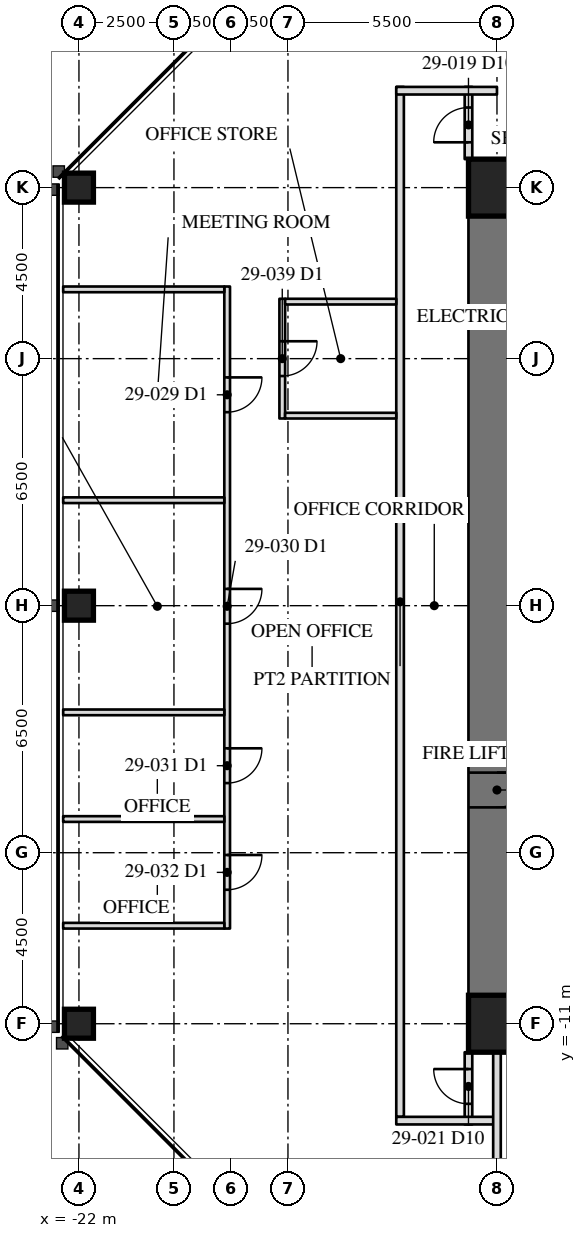
"""IFC4 building model, lengths in metres.
Left out: names, types, materials, properties, quantities, classifications, styles, units other than length and angle.
Written with IfcOpenShell. Run it as: python <this file> out.ifc"""

import sys

from ifc_helpers import new_model, si_unit, direction, frame, frame_2d, origin, origin_2d, place, context, subcontext, project, spatial, rectangle, hollow_rectangle, extrude, element, fill, save


model = new_model("IFC4")
c1 = context("Model", 3, precision=1e-05, world=origin(), true_north=direction((0.0, 1.0)))
c2 = subcontext(c1, "Body", "Model", "MODEL_VIEW")
j1 = project(units=[si_unit("LENGTHUNIT", "METRE"), si_unit("PLANEANGLEUNIT", "RADIAN")], contexts=[c1])
p1 = place(None, origin())
s1 = spatial("IfcSite", under=j1, at=p1, CompositionType="ELEMENT")
p2 = place(p1, origin())
s2 = spatial("IfcBuilding", under=s1, at=p2, CompositionType="ELEMENT")
p3 = place(p2, frame((0.0, 0.0, 125.4)))
s3 = spatial("IfcBuildingStorey", under=s2, at=p3, CompositionType="ELEMENT", Elevation=125.4)
for number, where, z_axis, x_axis in (
    (1, (-22.0, 0.0, 0.0), (0.0, 0.0, 1.0), (0.0, 1.0, 0.0)),
    (2, (-22.0, -11.0, 0.0), (0.0, 0.0, 1.0), (0.0, 1.0, 0.0)),
    (3, (-22.0, 11.0, 0.0), (0.0, 0.0, 1.0), (0.0, 1.0, 0.0)),
):
    element("IfcColumn", number, at=place(p3, frame(where, z_axis=z_axis, x_axis=x_axis)), inside=s3, PredefinedType="COLUMN", context=c2, shape_type="SweptSolid", body=[
        extrude(hollow_rectangle(XDim=0.762, YDim=0.762, WallThickness=0.076, at=origin_2d()), origin(), (0.0, 0.0, 1.0), 4.1),
    ])
p4 = place(p3, frame((-11.0, 11.0, 0.0), z_axis=(0.0, 0.0, 1.0), x_axis=(0.0, -1.0, 0.0)))
e4 = element("IfcWall", 4, at=p4, inside=s3, PredefinedType="SHEAR", context=c2, shape_type="SweptSolid", body=[
    extrude(rectangle(XDim=22.0, YDim=1.5, at=frame_2d((11.0, 0.0))), origin(), (0.0, 0.0, 1.0), 4.1),
])
p5 = place(p4, frame((15.393, 0.0, 0.0)))
e5 = element("IfcOpeningElement", 5, at=p5, cuts=e4, PredefinedType="OPENING", context=c2, shape_type="SweptSolid", body=[
    extrude(rectangle(XDim=0.915, YDim=2.134, at=frame_2d((0.458, 1.067))), frame((0.0, 0.76, 0.0), z_axis=(0.0, -1.0, 0.0), x_axis=(1.0, 0.0, 0.0)), (0.0, 0.0, 1.0), 1.52),
])
for number, where, z_axis, x_axis in (
    (6, (-6.5, 11.0, 0.0), (0.0, 0.0, 1.0), (-1.0, 0.0, 0.0)),
    (7, (-11.0, -11.0, 0.0), (0.0, 0.0, 1.0), (1.0, 0.0, 0.0)),
):
    element("IfcWall", number, at=place(p3, frame(where, z_axis=z_axis, x_axis=x_axis)), inside=s3, PredefinedType="SHEAR", context=c2, shape_type="SweptSolid", body=[
        extrude(rectangle(XDim=4.5, YDim=1.5, at=frame_2d((2.25, 0.0))), origin(), (0.0, 0.0, 1.0), 4.1),
    ])
for number, where, z_axis, x_axis in (
    (8, (-11.0, 11.0, 0.0), (0.0, 0.0, 1.0), (1.0, 0.0, 0.0)),
    (9, (-11.0, -11.0, 0.0), (0.0, 0.0, 1.0), (1.0, 0.0, 0.0)),
):
    element("IfcColumn", number, at=place(p3, frame(where, z_axis=z_axis, x_axis=x_axis)), inside=s3, PredefinedType="COLUMN", context=c2, shape_type="SweptSolid", body=[
        extrude(hollow_rectangle(XDim=1.499, YDim=1.499, WallThickness=0.102, at=origin_2d()), origin(), (0.0, 0.0, 1.0), 4.1),
    ])
p6 = place(p3, frame((-13.55, 13.65, 0.0), z_axis=(0.0, 0.0, 1.0), x_axis=(0.0, -1.0, 0.0)))
e10 = element("IfcWall", 10, at=p6, inside=s3, PredefinedType="PARTITIONING", context=c2, shape_type="SweptSolid", body=[
    extrude(rectangle(XDim=27.1, YDim=0.2, at=frame_2d((13.55, 0.0))), origin(), (0.0, 0.0, 1.0), 3.91),
])
p7 = place(p3, frame((-11.75, 11.75, 0.0), z_axis=(0.0, 0.0, 1.0), x_axis=(0.0, 1.0, 0.0)))
e11 = element("IfcWall", 11, at=p7, inside=s3, PredefinedType="PARTITIONING", context=c2, shape_type="SweptSolid", body=[
    extrude(rectangle(XDim=1.9, YDim=0.2, at=frame_2d((0.95, 0.0))), origin(), (0.0, 0.0, 1.0), 3.91),
])
p8 = place(p7, frame((0.442, 0.0, 0.0)))
e12 = element("IfcOpeningElement", 12, at=p8, cuts=e11, PredefinedType="OPENING", context=c2, shape_type="SweptSolid", body=[
    extrude(rectangle(XDim=0.915, YDim=2.134, at=frame_2d((0.458, 1.067))), frame((0.0, 0.11, 0.0), z_axis=(0.0, -1.0, 0.0), x_axis=(1.0, 0.0, 0.0)), (0.0, 0.0, 1.0), 0.22),
])
p9 = place(p3, frame((-11.0, 13.55, 0.0), z_axis=(0.0, 0.0, 1.0), x_axis=(-1.0, 0.0, 0.0)))
e13 = element("IfcWall", 13, at=p9, inside=s3, PredefinedType="PARTITIONING", context=c2, shape_type="SweptSolid", body=[
    extrude(rectangle(XDim=2.65, YDim=0.2, at=frame_2d((1.325, 0.0))), origin(), (0.0, 0.0, 1.0), 3.91),
])
p10 = place(p3, frame((-11.75, -11.75, 0.0), z_axis=(0.0, 0.0, 1.0), x_axis=(0.0, -1.0, 0.0)))
e14 = element("IfcWall", 14, at=p10, inside=s3, PredefinedType="PARTITIONING", context=c2, shape_type="SweptSolid", body=[
    extrude(rectangle(XDim=1.9, YDim=0.2, at=frame_2d((0.95, 0.0))), origin(), (0.0, 0.0, 1.0), 3.91),
])
p11 = place(p10, frame((0.442, 0.0, 0.0)))
e15 = element("IfcOpeningElement", 15, at=p11, cuts=e14, PredefinedType="OPENING", context=c2, shape_type="SweptSolid", body=[
    extrude(rectangle(XDim=0.915, YDim=2.134, at=frame_2d((0.458, 1.067))), frame((0.0, 0.11, 0.0), z_axis=(0.0, -1.0, 0.0), x_axis=(1.0, 0.0, 0.0)), (0.0, 0.0, 1.0), 0.22),
])
p12 = place(p3, frame((-11.0, -13.55, 0.0), z_axis=(0.0, 0.0, 1.0), x_axis=(-1.0, 0.0, 0.0)))
e16 = element("IfcWall", 16, at=p12, inside=s3, PredefinedType="PARTITIONING", context=c2, shape_type="SweptSolid", body=[
    extrude(rectangle(XDim=2.65, YDim=0.2, at=frame_2d((1.325, 0.0))), origin(), (0.0, 0.0, 1.0), 3.91),
])
p13 = place(p3, frame((-11.0, -11.75, 0.0), z_axis=(0.0, 0.0, 1.0), x_axis=(0.0, -1.0, 0.0)))
e17 = element("IfcWall", 17, at=p13, inside=s3, PredefinedType="PARTITIONING", context=c2, shape_type="SweptSolid", body=[
    extrude(rectangle(XDim=10.665, YDim=0.2, at=frame_2d((5.333, 0.0))), origin(), (0.0, 0.0, 1.0), 3.326),
])
p14 = place(p3, frame((-18.1, 8.398, 0.0), z_axis=(0.0, 0.0, 1.0), x_axis=(0.0, -1.0, 0.0)))
e18 = element("IfcWall", 18, at=p14, inside=s3, PredefinedType="PARTITIONING", context=c2, shape_type="SweptSolid", body=[
    extrude(rectangle(XDim=16.894, YDim=0.15, at=frame_2d((8.447, 0.0))), origin(), (0.0, 0.0, 1.0), 3.91),
])
p15 = place(p14, frame((2.392, 0.0, 0.0)))
e19 = element("IfcOpeningElement", 19, at=p15, cuts=e18, PredefinedType="OPENING", context=c2, shape_type="SweptSolid", body=[
    extrude(rectangle(XDim=0.915, YDim=2.134, at=frame_2d((0.458, 1.067))), frame((0.0, 0.085, 0.0), z_axis=(0.0, -1.0, 0.0), x_axis=(1.0, 0.0, 0.0)), (0.0, 0.0, 1.0), 0.17),
])
p16 = place(p14, frame((7.957, 0.0, 0.0)))
e20 = element("IfcOpeningElement", 20, at=p16, cuts=e18, PredefinedType="OPENING", context=c2, shape_type="SweptSolid", body=[
    extrude(rectangle(XDim=0.915, YDim=2.134, at=frame_2d((0.458, 1.067))), frame((0.0, 0.085, 0.0), z_axis=(0.0, -1.0, 0.0), x_axis=(1.0, 0.0, 0.0)), (0.0, 0.0, 1.0), 0.17),
])
p17 = place(p14, frame((12.151, 0.0, 0.0)))
e21 = element("IfcOpeningElement", 21, at=p17, cuts=e18, PredefinedType="OPENING", context=c2, shape_type="SweptSolid", body=[
    extrude(rectangle(XDim=0.915, YDim=2.134, at=frame_2d((0.458, 1.067))), frame((0.0, 0.085, 0.0), z_axis=(0.0, -1.0, 0.0), x_axis=(1.0, 0.0, 0.0)), (0.0, 0.0, 1.0), 0.17),
])
p18 = place(p14, frame((14.958, 0.0, 0.0)))
e22 = element("IfcOpeningElement", 22, at=p18, cuts=e18, PredefinedType="OPENING", context=c2, shape_type="SweptSolid", body=[
    extrude(rectangle(XDim=0.915, YDim=2.134, at=frame_2d((0.458, 1.067))), frame((0.0, 0.085, 0.0), z_axis=(0.0, -1.0, 0.0), x_axis=(1.0, 0.0, 0.0)), (0.0, 0.0, 1.0), 0.17),
])
for number, where, z_axis, x_axis in (
    (23, (-18.175, 8.323, 0.0), (0.0, 0.0, 1.0), (-1.0, 0.0, 0.0)),
    (24, (-18.175, 2.775, 0.0), (0.0, 0.0, 1.0), (-1.0, 0.0, 0.0)),
    (25, (-18.175, -2.807, 0.0), (0.0, 0.0, 1.0), (-1.0, 0.0, 0.0)),
    (26, (-18.175, -5.614, 0.0), (0.0, 0.0, 1.0), (-1.0, 0.0, 0.0)),
    (27, (-18.175, -8.421, 0.0), (0.0, 0.0, 1.0), (-1.0, 0.0, 0.0)),
):
    element("IfcWall", number, at=place(p3, frame(where, z_axis=z_axis, x_axis=x_axis)), inside=s3, PredefinedType="PARTITIONING", context=c2, shape_type="SweptSolid", body=[
        extrude(rectangle(XDim=4.24, YDim=0.15, at=frame_2d((2.12, 0.0))), origin(), (0.0, 0.0, 1.0), 3.91),
    ])
p19 = place(p3, frame((-16.65, 8.075, 0.0), z_axis=(0.0, 0.0, 1.0), x_axis=(0.0, -1.0, 0.0)))
e28 = element("IfcWall", 28, at=p19, inside=s3, PredefinedType="PARTITIONING", context=c2, shape_type="SweptSolid", body=[
    extrude(rectangle(XDim=3.15, YDim=0.15, at=frame_2d((1.575, 0.0))), origin(), (0.0, 0.0, 1.0), 3.91),
])
p20 = place(p19, frame((1.117, 0.0, 0.0)))
e29 = element("IfcOpeningElement", 29, at=p20, cuts=e28, PredefinedType="OPENING", context=c2, shape_type="SweptSolid", body=[
    extrude(rectangle(XDim=0.915, YDim=2.134, at=frame_2d((0.458, 1.067))), frame((0.0, 0.085, 0.0), z_axis=(0.0, -1.0, 0.0), x_axis=(1.0, 0.0, 0.0)), (0.0, 0.0, 1.0), 0.17),
])
for number, where, z_axis, x_axis in (
    (30, (-16.575, 8.0, 0.0), (0.0, 0.0, 1.0), (1.0, 0.0, 0.0)),
    (31, (-16.575, 5.0, 0.0), (0.0, 0.0, 1.0), (1.0, 0.0, 0.0)),
):
    element("IfcWall", number, at=place(p3, frame(where, z_axis=z_axis, x_axis=x_axis)), inside=s3, PredefinedType="PARTITIONING", context=c2, shape_type="SweptSolid", body=[
        extrude(rectangle(XDim=2.925, YDim=0.15, at=frame_2d((1.462, 0.0))), origin(), (0.0, 0.0, 1.0), 3.91),
    ])
p21 = place(p5, origin())
e32 = element("IfcDoor", 32, at=p21, inside=s3, OperationType="SINGLE_SWING_RIGHT", PredefinedType="DOOR", context=c2, shape_type="SweptSolid", body=[
    extrude(rectangle(XDim=0.915, YDim=2.134, at=frame_2d((0.458, 1.067))), frame((0.0, -0.675, 0.0), z_axis=(0.0, -1.0, 0.0), x_axis=(1.0, 0.0, 0.0)), (0.0, 0.0, 1.0), 0.05),
])
fill(e5, e32)
p22 = place(p8, origin())
e33 = element("IfcDoor", 33, at=p22, inside=s3, OperationType="SINGLE_SWING_LEFT", PredefinedType="DOOR", context=c2, shape_type="SweptSolid", body=[
    extrude(rectangle(XDim=0.915, YDim=2.134, at=frame_2d((0.458, 1.067))), frame((0.0, 0.025, 0.0), z_axis=(0.0, -1.0, 0.0), x_axis=(1.0, 0.0, 0.0)), (0.0, 0.0, 1.0), 0.05),
])
fill(e12, e33)
p23 = place(p11, frame((0.915, 0.0, 0.0), z_axis=(0.0, 0.0, 1.0), x_axis=(-1.0, 0.0, 0.0)))
e34 = element("IfcDoor", 34, at=p23, inside=s3, OperationType="SINGLE_SWING_LEFT", PredefinedType="DOOR", context=c2, shape_type="SweptSolid", body=[
    extrude(rectangle(XDim=0.915, YDim=2.134, at=frame_2d((0.458, 1.067))), frame((0.0, 0.025, 0.0), z_axis=(0.0, -1.0, 0.0), x_axis=(1.0, 0.0, 0.0)), (0.0, 0.0, 1.0), 0.05),
])
fill(e15, e34)
p24 = place(p15, origin())
e35 = element("IfcDoor", 35, at=p24, inside=s3, OperationType="SINGLE_SWING_LEFT", PredefinedType="DOOR", context=c2, shape_type="SweptSolid", body=[
    extrude(rectangle(XDim=0.915, YDim=2.134, at=frame_2d((0.458, 1.067))), frame((0.0, 0.025, 0.0), z_axis=(0.0, -1.0, 0.0), x_axis=(1.0, 0.0, 0.0)), (0.0, 0.0, 1.0), 0.05),
])
fill(e19, e35)
p25 = place(p16, origin())
e36 = element("IfcDoor", 36, at=p25, inside=s3, OperationType="SINGLE_SWING_LEFT", PredefinedType="DOOR", context=c2, shape_type="SweptSolid", body=[
    extrude(rectangle(XDim=0.915, YDim=2.134, at=frame_2d((0.458, 1.067))), frame((0.0, 0.025, 0.0), z_axis=(0.0, -1.0, 0.0), x_axis=(1.0, 0.0, 0.0)), (0.0, 0.0, 1.0), 0.05),
])
fill(e20, e36)
p26 = place(p17, origin())
e37 = element("IfcDoor", 37, at=p26, inside=s3, OperationType="SINGLE_SWING_LEFT", PredefinedType="DOOR", context=c2, shape_type="SweptSolid", body=[
    extrude(rectangle(XDim=0.915, YDim=2.134, at=frame_2d((0.458, 1.067))), frame((0.0, 0.025, 0.0), z_axis=(0.0, -1.0, 0.0), x_axis=(1.0, 0.0, 0.0)), (0.0, 0.0, 1.0), 0.05),
])
fill(e21, e37)
p27 = place(p18, origin())
e38 = element("IfcDoor", 38, at=p27, inside=s3, OperationType="SINGLE_SWING_LEFT", PredefinedType="DOOR", context=c2, shape_type="SweptSolid", body=[
    extrude(rectangle(XDim=0.915, YDim=2.134, at=frame_2d((0.458, 1.067))), frame((0.0, 0.025, 0.0), z_axis=(0.0, -1.0, 0.0), x_axis=(1.0, 0.0, 0.0)), (0.0, 0.0, 1.0), 0.05),
])
fill(e22, e38)
p28 = place(p20, origin())
e39 = element("IfcDoor", 39, at=p28, inside=s3, OperationType="SINGLE_SWING_LEFT", PredefinedType="DOOR", context=c2, shape_type="SweptSolid", body=[
    extrude(rectangle(XDim=0.915, YDim=2.134, at=frame_2d((0.458, 1.067))), frame((0.0, 0.025, 0.0), z_axis=(0.0, -1.0, 0.0), x_axis=(1.0, 0.0, 0.0)), (0.0, 0.0, 1.0), 0.05),
])
fill(e29, e39)
save(model, sys.argv[1])
